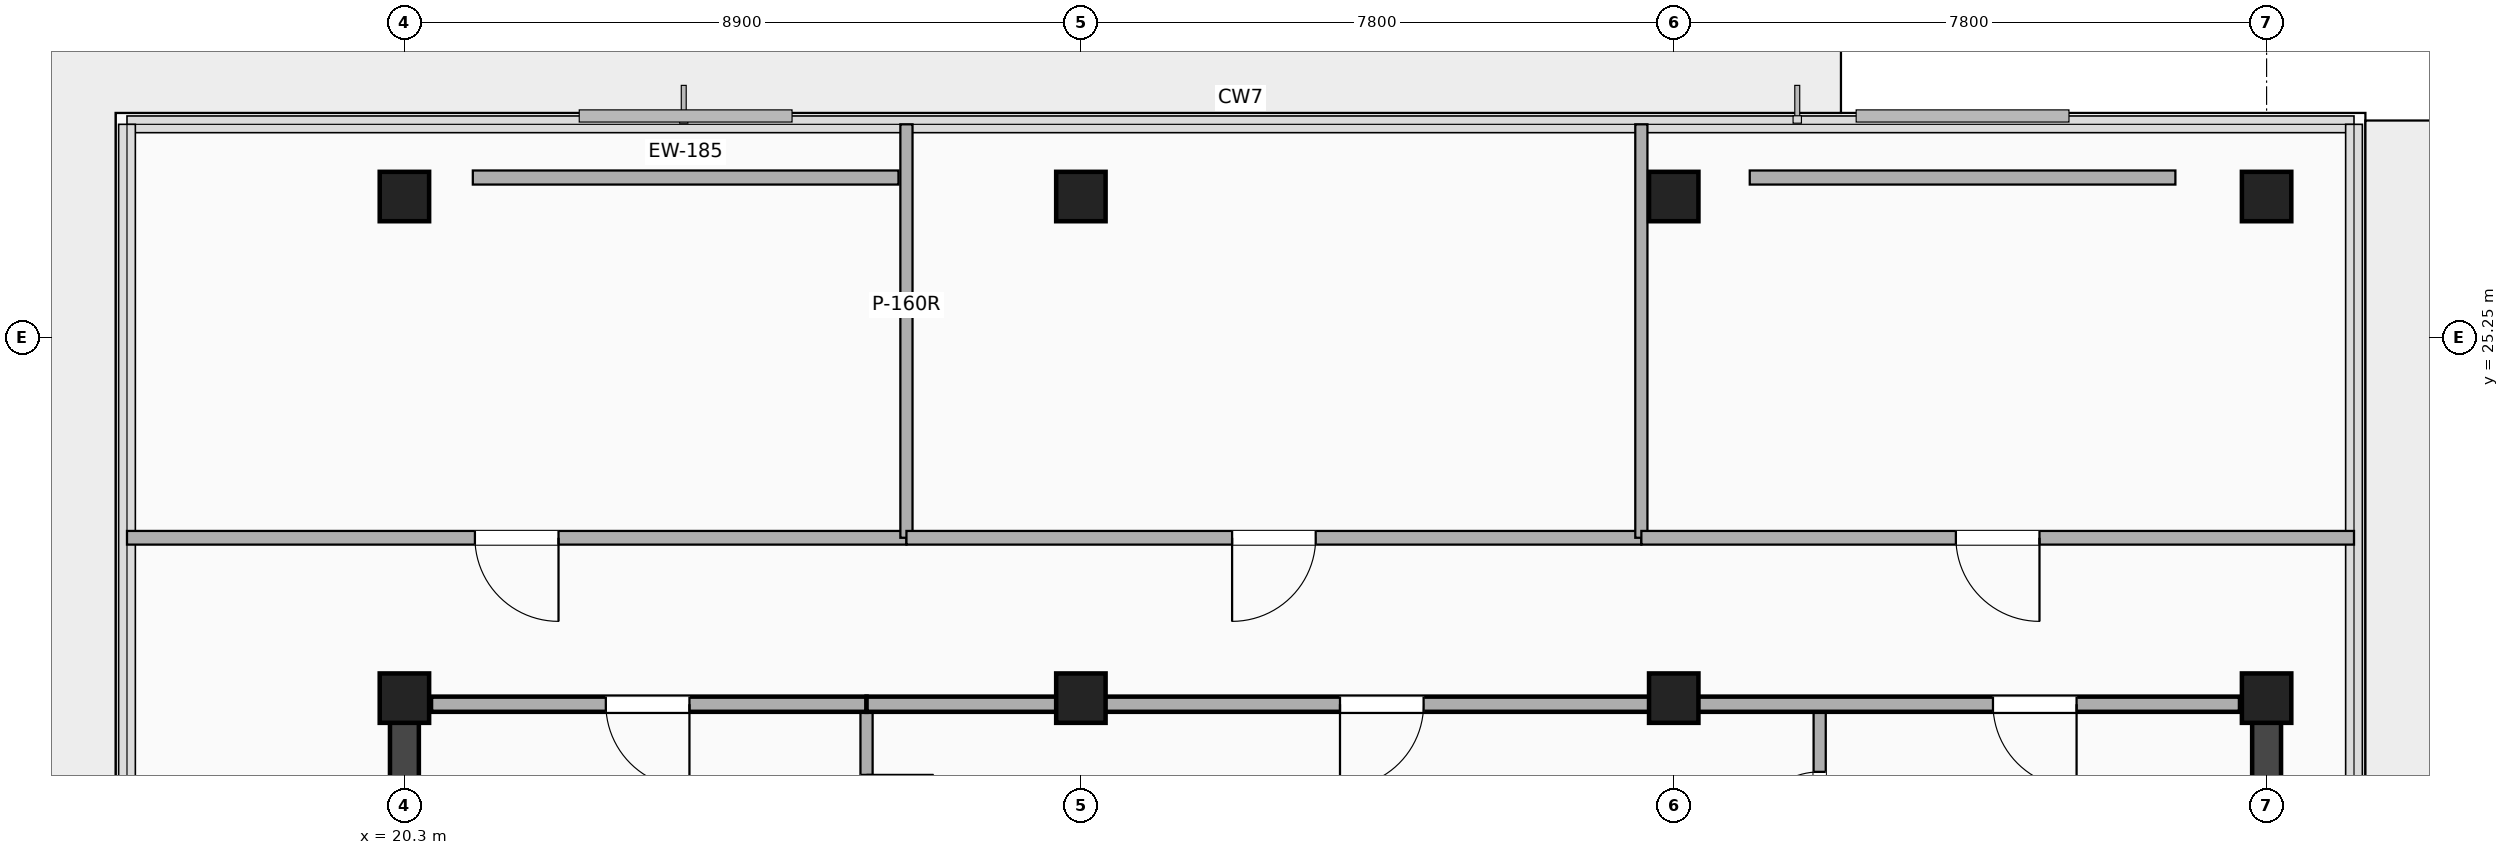
"""IFC4 building model, lengths in metres.
Left out: names, types, materials, properties, quantities, classifications, styles, units other than length and angle.
Written with IfcOpenShell. Run it as: python <this file> out.ifc"""

import sys

from ifc_helpers import new_model, si_unit, direction, frame, frame_2d, origin, origin_2d, place, context, subcontext, project, spatial, rectangle, extrude, element, fill, save


model = new_model("IFC4")
c1 = context("Model", 3, precision=1e-05, world=origin(), true_north=direction((0.0, 1.0)))
c2 = subcontext(c1, "Body", "Model", "MODEL_VIEW")
j1 = project(units=[si_unit("LENGTHUNIT", "METRE"), si_unit("PLANEANGLEUNIT", "RADIAN")], contexts=[c1])
p1 = place(None, origin())
s1 = spatial("IfcSite", under=j1, at=p1, CompositionType="ELEMENT")
p2 = place(p1, origin())
s2 = spatial("IfcBuilding", under=s1, at=p2, CompositionType="ELEMENT")
p3 = place(p2, frame((0.0, 0.0, 298.7)))
s3 = spatial("IfcBuildingStorey", under=s2, at=p3, CompositionType="ELEMENT", Elevation=298.7)
for number, where, z_axis, x_axis in (
    (1, (20.3, 3.5, 0.0), (0.0, 0.0, 1.0), (0.0, 1.0, 0.0)),
    (2, (44.8, 3.5, 0.0), (0.0, 0.0, 1.0), (0.0, 1.0, 0.0)),
):
    element("IfcWall", number, at=place(p3, frame(where, z_axis=z_axis, x_axis=x_axis)), inside=s3, PredefinedType="SHEAR", context=c2, shape_type="SweptSolid", body=[
        extrude(rectangle(XDim=16.9, YDim=0.38, at=frame_2d((8.45, 0.0))), origin(), (0.0, 0.0, 1.0), 4.3),
    ])
for number, where, z_axis, x_axis in (
    (3, (20.3, 20.5, -0.3), (0.0, 0.0, 1.0), (1.0, 0.0, 0.0)),
    (4, (29.2, 20.5, -0.3), (0.0, 0.0, 1.0), (1.0, 0.0, 0.0)),
    (5, (37.0, 20.5, -0.3), (0.0, 0.0, 1.0), (1.0, 0.0, 0.0)),
    (6, (44.8, 20.5, -0.3), (0.0, 0.0, 1.0), (1.0, 0.0, 0.0)),
    (7, (20.3, 27.1, -0.3), (0.0, 0.0, 1.0), (1.0, 0.0, 0.0)),
    (8, (29.2, 27.1, -0.3), (0.0, 0.0, 1.0), (1.0, 0.0, 0.0)),
    (9, (37.0, 27.1, -0.3), (0.0, 0.0, 1.0), (1.0, 0.0, 0.0)),
    (10, (44.8, 27.1, -0.3), (0.0, 0.0, 1.0), (1.0, 0.0, 0.0)),
):
    element("IfcColumn", number, at=place(p3, frame(where, z_axis=z_axis, x_axis=x_axis)), inside=s3, PredefinedType="COLUMN", context=c2, shape_type="SweptSolid", body=[
        extrude(rectangle(XDim=0.65, YDim=0.65, at=origin_2d()), origin(), (0.0, 0.0, 1.0), 4.6),
    ])
p4 = place(p3, frame((21.2, 27.35, 0.0), z_axis=(0.0, 0.0, 1.0), x_axis=(1.0, 0.0, 0.0)))
e11 = element("IfcWall", 11, at=p4, inside=s3, PredefinedType="ELEMENTEDWALL", context=c2, shape_type="SweptSolid", body=[
    extrude(rectangle(XDim=5.6, YDim=0.185, at=frame_2d((2.8, 0.0))), origin(), (0.0, 0.0, 1.0), 2.605),
])
p5 = place(p3, frame((38.0, 27.35, 0.0), z_axis=(0.0, 0.0, 1.0), x_axis=(1.0, 0.0, 0.0)))
e12 = element("IfcWall", 12, at=p5, inside=s3, PredefinedType="ELEMENTEDWALL", context=c2, shape_type="SweptSolid", body=[
    extrude(rectangle(XDim=5.6, YDim=0.185, at=frame_2d((2.8, 0.0))), origin(), (0.0, 0.0, 1.0), 3.885),
])
p6 = place(p3, frame((26.38, 17.76, 0.0), z_axis=(0.0, 0.0, 1.0), x_axis=(0.0, 1.0, 0.0)))
e13 = element("IfcWall", 13, at=p6, inside=s3, PredefinedType="PARTITIONING", context=c2, shape_type="SweptSolid", body=[
    extrude(rectangle(XDim=2.66, YDim=0.16, at=frame_2d((1.33, 0.0))), origin(), (0.0, 0.0, 1.0), 3.512),
])
p7 = place(p6, frame((0.85, 0.0, 0.0)))
e14 = element("IfcOpeningElement", 14, at=p7, cuts=e13, PredefinedType="OPENING", context=c2, shape_type="SweptSolid", body=[
    extrude(rectangle(XDim=0.88, YDim=2.08, at=frame_2d((0.44, 1.04))), frame((0.0, 0.09, 0.0), z_axis=(0.0, -1.0, 0.0), x_axis=(1.0, 0.0, 0.0)), (0.0, 0.0, 1.0), 0.18),
])
p8 = place(p3, frame((38.92, 17.76, 0.0), z_axis=(0.0, 0.0, 1.0), x_axis=(0.0, 1.0, 0.0)))
e15 = element("IfcWall", 15, at=p8, inside=s3, PredefinedType="PARTITIONING", context=c2, shape_type="SweptSolid", body=[
    extrude(rectangle(XDim=2.66, YDim=0.16, at=frame_2d((1.33, 0.0))), origin(), (0.0, 0.0, 1.0), 3.885),
])
p9 = place(p8, frame((1.77, 0.0, 0.0), z_axis=(0.0, 0.0, 1.0), x_axis=(-1.0, 0.0, 0.0)))
e16 = element("IfcOpeningElement", 16, at=p9, cuts=e15, PredefinedType="OPENING", context=c2, shape_type="SweptSolid", body=[
    extrude(rectangle(XDim=0.92, YDim=2.08, at=frame_2d((0.46, 1.04))), frame((0.0, 0.09, 0.0), z_axis=(0.0, -1.0, 0.0), x_axis=(1.0, 0.0, 0.0)), (0.0, 0.0, 1.0), 0.18),
])
p10 = place(p3, frame((20.65, 20.42, 0.0), z_axis=(0.0, 0.0, 1.0), x_axis=(1.0, 0.0, 0.0)))
e17 = element("IfcWall", 17, at=p10, inside=s3, PredefinedType="PARTITIONING", context=c2, shape_type="SweptSolid", body=[
    extrude(rectangle(XDim=5.73, YDim=0.2, at=frame_2d((2.865, 0.0))), origin(), (0.0, 0.0, 1.0), 2.605),
])
p11 = place(p10, frame((2.3, 0.0, 0.0)))
e18 = element("IfcOpeningElement", 18, at=p11, cuts=e17, PredefinedType="OPENING", context=c2, shape_type="SweptSolid", body=[
    extrude(rectangle(XDim=1.1, YDim=2.15, at=frame_2d((0.55, 1.075))), frame((0.0, 0.11, 0.0), z_axis=(0.0, -1.0, 0.0), x_axis=(1.0, 0.0, 0.0)), (0.0, 0.0, 1.0), 0.22),
])
p12 = place(p3, frame((26.38, 20.42, 0.0), z_axis=(0.0, 0.0, 1.0), x_axis=(1.0, 0.0, 0.0)))
e19 = element("IfcWall", 19, at=p12, inside=s3, PredefinedType="PARTITIONING", context=c2, shape_type="SweptSolid", body=[
    extrude(rectangle(XDim=2.82, YDim=0.2, at=frame_2d((1.41, 0.0))), origin(), (0.0, 0.0, 1.0), 2.605),
])
p13 = place(p3, frame((29.2, 20.42, 0.0), z_axis=(0.0, 0.0, 1.0), x_axis=(1.0, 0.0, 0.0)))
e20 = element("IfcWall", 20, at=p13, inside=s3, PredefinedType="PARTITIONING", context=c2, shape_type="SweptSolid", body=[
    extrude(rectangle(XDim=7.8, YDim=0.2, at=frame_2d((3.9, 0.0))), origin(), (0.0, 0.0, 1.0), 2.605),
])
p14 = place(p13, frame((3.409, 0.0, 0.0)))
e21 = element("IfcOpeningElement", 21, at=p14, cuts=e20, PredefinedType="OPENING", context=c2, shape_type="SweptSolid", body=[
    extrude(rectangle(XDim=1.1, YDim=2.15, at=frame_2d((0.55, 1.075))), frame((0.0, 0.11, 0.0), z_axis=(0.0, -1.0, 0.0), x_axis=(1.0, 0.0, 0.0)), (0.0, 0.0, 1.0), 0.22),
])
p15 = place(p3, frame((37.0, 20.42, 0.0), z_axis=(0.0, 0.0, 1.0), x_axis=(1.0, 0.0, 0.0)))
e22 = element("IfcWall", 22, at=p15, inside=s3, PredefinedType="PARTITIONING", context=c2, shape_type="SweptSolid", body=[
    extrude(rectangle(XDim=7.45, YDim=0.2, at=frame_2d((3.725, 0.0))), origin(), (0.0, 0.0, 1.0), 2.605),
])
p16 = place(p15, frame((4.2, 0.0, 0.0)))
e23 = element("IfcOpeningElement", 23, at=p16, cuts=e22, PredefinedType="OPENING", context=c2, shape_type="SweptSolid", body=[
    extrude(rectangle(XDim=1.1, YDim=2.15, at=frame_2d((0.55, 1.075))), frame((0.0, 0.11, 0.0), z_axis=(0.0, -1.0, 0.0), x_axis=(1.0, 0.0, 0.0)), (0.0, 0.0, 1.0), 0.22),
])
p17 = place(p3, frame((16.65, 22.61, 0.0), z_axis=(0.0, 0.0, 1.0), x_axis=(1.0, 0.0, 0.0)))
e24 = element("IfcWall", 24, at=p17, inside=s3, PredefinedType="PARTITIONING", context=c2, shape_type="SweptSolid", body=[
    extrude(rectangle(XDim=10.255, YDim=0.18, at=frame_2d((5.127, 0.0))), origin(), (0.0, 0.0, 1.0), 2.605),
])
p18 = place(p17, frame((4.577, 0.0, 0.0)))
e25 = element("IfcOpeningElement", 25, at=p18, cuts=e24, PredefinedType="OPENING", context=c2, shape_type="SweptSolid", body=[
    extrude(rectangle(XDim=1.1, YDim=2.15, at=frame_2d((0.55, 1.075))), frame((0.0, 0.1, 0.0), z_axis=(0.0, -1.0, 0.0), x_axis=(1.0, 0.0, 0.0)), (0.0, 0.0, 1.0), 0.2),
])
p19 = place(p3, frame((26.905, 22.61, 0.0), z_axis=(0.0, 0.0, 1.0), x_axis=(0.0, 1.0, 0.0)))
e26 = element("IfcWall", 26, at=p19, inside=s3, PredefinedType="PARTITIONING", context=c2, shape_type="SweptSolid", body=[
    extrude(rectangle(XDim=5.44, YDim=0.16, at=frame_2d((2.72, 0.0))), origin(), (0.0, 0.0, 1.0), 3.885),
])
p20 = place(p3, frame((26.905, 22.61, 0.0), z_axis=(0.0, 0.0, 1.0), x_axis=(1.0, 0.0, 0.0)))
e27 = element("IfcWall", 27, at=p20, inside=s3, PredefinedType="PARTITIONING", context=c2, shape_type="SweptSolid", body=[
    extrude(rectangle(XDim=9.669, YDim=0.18, at=frame_2d((4.834, 0.0))), origin(), (0.0, 0.0, 1.0), 2.605),
])
p21 = place(p20, frame((4.284, 0.0, 0.0)))
e28 = element("IfcOpeningElement", 28, at=p21, cuts=e27, PredefinedType="OPENING", context=c2, shape_type="SweptSolid", body=[
    extrude(rectangle(XDim=1.1, YDim=2.15, at=frame_2d((0.55, 1.075))), frame((0.0, 0.1, 0.0), z_axis=(0.0, -1.0, 0.0), x_axis=(1.0, 0.0, 0.0)), (0.0, 0.0, 1.0), 0.2),
])
p22 = place(p3, frame((36.574, 22.61, 0.0), z_axis=(0.0, 0.0, 1.0), x_axis=(0.0, 1.0, 0.0)))
e29 = element("IfcWall", 29, at=p22, inside=s3, PredefinedType="PARTITIONING", context=c2, shape_type="SweptSolid", body=[
    extrude(rectangle(XDim=5.44, YDim=0.16, at=frame_2d((2.72, 0.0))), origin(), (0.0, 0.0, 1.0), 2.605),
])
p23 = place(p3, frame((36.574, 22.61, 0.0), z_axis=(0.0, 0.0, 1.0), x_axis=(1.0, 0.0, 0.0)))
e30 = element("IfcWall", 30, at=p23, inside=s3, PredefinedType="PARTITIONING", context=c2, shape_type="SweptSolid", body=[
    extrude(rectangle(XDim=9.376, YDim=0.18, at=frame_2d((4.688, 0.0))), origin(), (0.0, 0.0, 1.0), 2.605),
])
p24 = place(p23, frame((4.138, 0.0, 0.0)))
e31 = element("IfcOpeningElement", 31, at=p24, cuts=e30, PredefinedType="OPENING", context=c2, shape_type="SweptSolid", body=[
    extrude(rectangle(XDim=1.1, YDim=2.15, at=frame_2d((0.55, 1.075))), frame((0.0, 0.1, 0.0), z_axis=(0.0, -1.0, 0.0), x_axis=(1.0, 0.0, 0.0)), (0.0, 0.0, 1.0), 0.2),
])
p25 = place(p9, origin())
e32 = element("IfcDoor", 32, at=p25, inside=s3, OperationType="SINGLE_SWING_LEFT", PredefinedType="DOOR", context=c2, shape_type="SweptSolid", body=[
    extrude(rectangle(XDim=0.92, YDim=2.08, at=frame_2d((0.46, 1.04))), frame((0.0, 0.025, 0.0), z_axis=(0.0, -1.0, 0.0), x_axis=(1.0, 0.0, 0.0)), (0.0, 0.0, 1.0), 0.05),
])
fill(e16, e32)
p26 = place(p11, origin())
e33 = element("IfcDoor", 33, at=p26, inside=s3, OperationType="SINGLE_SWING_RIGHT", PredefinedType="DOOR", context=c2, shape_type="SweptSolid", body=[
    extrude(rectangle(XDim=1.1, YDim=2.15, at=frame_2d((0.55, 1.075))), frame((0.0, 0.025, 0.0), z_axis=(0.0, -1.0, 0.0), x_axis=(1.0, 0.0, 0.0)), (0.0, 0.0, 1.0), 0.05),
])
fill(e18, e33)
p27 = place(p14, origin())
e34 = element("IfcDoor", 34, at=p27, inside=s3, OperationType="SINGLE_SWING_LEFT", PredefinedType="DOOR", context=c2, shape_type="SweptSolid", body=[
    extrude(rectangle(XDim=1.1, YDim=2.15, at=frame_2d((0.55, 1.075))), frame((0.0, 0.025, 0.0), z_axis=(0.0, -1.0, 0.0), x_axis=(1.0, 0.0, 0.0)), (0.0, 0.0, 1.0), 0.05),
])
fill(e21, e34)
p28 = place(p16, origin())
e35 = element("IfcDoor", 35, at=p28, inside=s3, OperationType="SINGLE_SWING_RIGHT", PredefinedType="DOOR", context=c2, shape_type="SweptSolid", body=[
    extrude(rectangle(XDim=1.1, YDim=2.15, at=frame_2d((0.55, 1.075))), frame((0.0, 0.025, 0.0), z_axis=(0.0, -1.0, 0.0), x_axis=(1.0, 0.0, 0.0)), (0.0, 0.0, 1.0), 0.05),
])
fill(e23, e35)
p29 = place(p18, origin())
e36 = element("IfcDoor", 36, at=p29, inside=s3, OperationType="SINGLE_SWING_RIGHT", PredefinedType="DOOR", context=c2, shape_type="SweptSolid", body=[
    extrude(rectangle(XDim=1.1, YDim=2.15, at=frame_2d((0.55, 1.075))), frame((0.0, 0.025, 0.0), z_axis=(0.0, -1.0, 0.0), x_axis=(1.0, 0.0, 0.0)), (0.0, 0.0, 1.0), 0.05),
])
fill(e25, e36)
p30 = place(p21, origin())
e37 = element("IfcDoor", 37, at=p30, inside=s3, OperationType="SINGLE_SWING_LEFT", PredefinedType="DOOR", context=c2, shape_type="SweptSolid", body=[
    extrude(rectangle(XDim=1.1, YDim=2.15, at=frame_2d((0.55, 1.075))), frame((0.0, 0.025, 0.0), z_axis=(0.0, -1.0, 0.0), x_axis=(1.0, 0.0, 0.0)), (0.0, 0.0, 1.0), 0.05),
])
fill(e28, e37)
p31 = place(p24, origin())
e38 = element("IfcDoor", 38, at=p31, inside=s3, OperationType="SINGLE_SWING_RIGHT", PredefinedType="DOOR", context=c2, shape_type="SweptSolid", body=[
    extrude(rectangle(XDim=1.1, YDim=2.15, at=frame_2d((0.55, 1.075))), frame((0.0, 0.025, 0.0), z_axis=(0.0, -1.0, 0.0), x_axis=(1.0, 0.0, 0.0)), (0.0, 0.0, 1.0), 0.05),
])
fill(e31, e38)
save(model, sys.argv[1])
